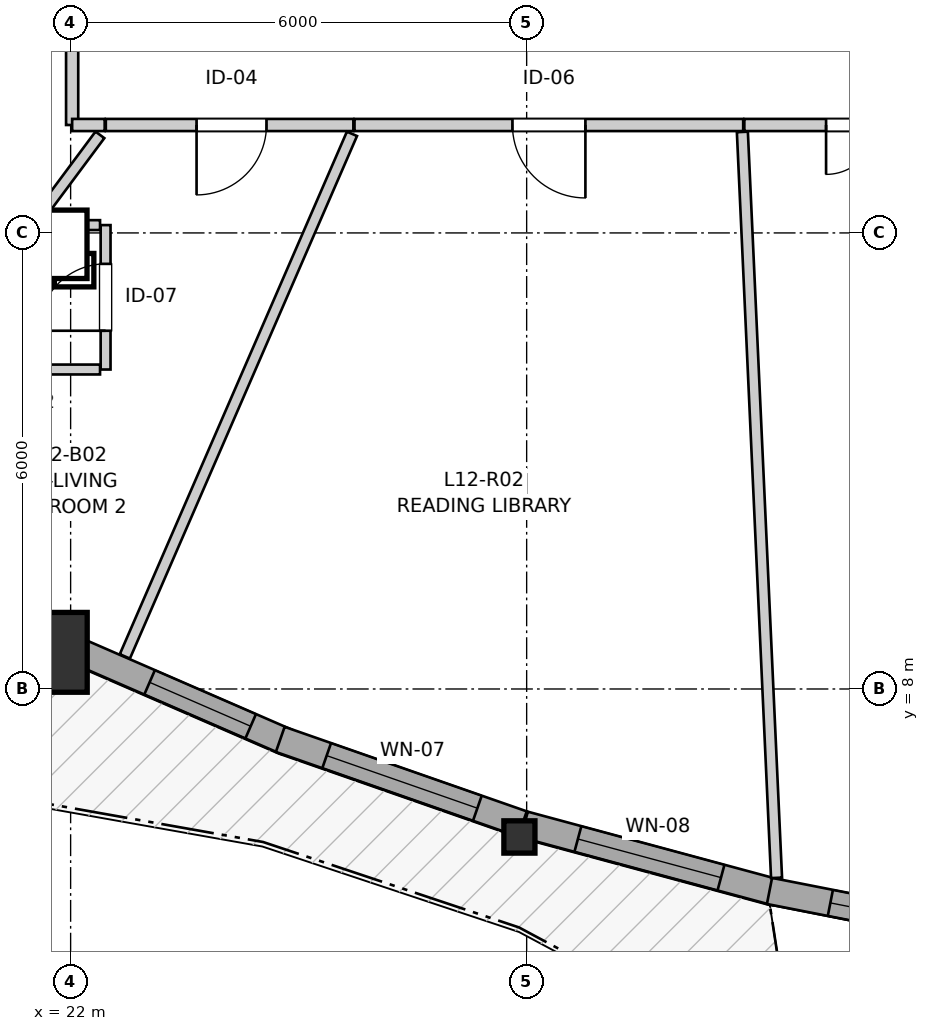
"""IFC4 building model, lengths in metres.
Left out: names, types, materials, properties, quantities, classifications, styles, units other than length and angle.
Written with IfcOpenShell. Run it as: python <this file> out.ifc"""

import sys

from ifc_helpers import new_model, si_unit, direction, frame, frame_2d, origin, origin_2d, place, context, subcontext, project, spatial, rectangle, i_section, extrude, source, transform, mapped, element, fill, save


model = new_model("IFC4")
c1 = context("Model", 3, precision=1e-05, world=origin(), true_north=direction((0.0, 1.0)))
c2 = subcontext(c1, "Body", "Model", "MODEL_VIEW")
j1 = project(units=[si_unit("LENGTHUNIT", "METRE"), si_unit("PLANEANGLEUNIT", "RADIAN")], contexts=[c1])
p1 = place(None, origin())
s1 = spatial("IfcSite", under=j1, at=p1, CompositionType="ELEMENT")
p2 = place(p1, origin())
s2 = spatial("IfcBuilding", under=s1, at=p2, CompositionType="ELEMENT")
p3 = place(p2, frame((0.0, 0.0, 43.0)))
s3 = spatial("IfcBuildingStorey", under=s2, at=p3, CompositionType="ELEMENT", Elevation=43.0)
m1 = source(origin(), c2, "Body", "SweptSolid", [
    extrude(rectangle(XDim=1.05, YDim=1.05, at=origin_2d()), origin(), (0.0, 0.0, 1.0), 2.94),
])
p4 = place(p3, frame((21.693, 8.482, 0.0), z_axis=(0.0, 0.0, 1.0), x_axis=(1.0, 0.0, 0.0)))
e1 = element("IfcColumn", 1, at=p4, inside=s3, PredefinedType="COLUMN", context=c2, shape_type="MappedRepresentation", body=[
    mapped(m1, transform((0.0, 0.0, 0.0), x_axis=(1.0, 0.0, 0.0), y_axis=(0.0, 1.0, 0.0), z_axis=(0.0, 0.0, 1.0), scale=1.0)),
])
m2 = source(origin(), c2, "Body", "SweptSolid", [
    extrude(i_section(OverallWidth=0.409, OverallDepth=0.425, WebThickness=0.03, FlangeThickness=0.048, FilletRadius=0.015, at=origin_2d()), origin(), (0.0, 0.0, 1.0), 2.94),
])
p5 = place(p3, frame((27.905, 6.053, 0.0), z_axis=(0.0, 0.0, 1.0), x_axis=(1.0, 0.0, 0.0)))
e2 = element("IfcColumn", 2, at=p5, inside=s3, PredefinedType="PILASTER", context=c2, shape_type="MappedRepresentation", body=[
    mapped(m2, transform((0.0, 0.0, 0.0), x_axis=(1.0, 0.0, 0.0), y_axis=(0.0, 1.0, 0.0), z_axis=(0.0, 0.0, 1.0), scale=1.0)),
])
p6 = place(p3, frame((22.038, 8.523, 0.0), z_axis=(0.0, 0.0, 1.0), x_axis=(0.91704973522, -0.398772846535, 0.0)))
e3 = element("IfcWall", 3, at=p6, inside=s3, PredefinedType="SOLIDWALL", context=c2, shape_type="SweptSolid", body=[
    extrude(rectangle(XDim=3.056, YDim=0.35, at=frame_2d((1.528, 0.0))), origin(), (0.0, 0.0, 1.0), 2.42),
])
p7 = place(p6, frame((1.092, 0.0, 0.82)))
e4 = element("IfcOpeningElement", 4, at=p7, cuts=e3, PredefinedType="OPENING", context=c2, shape_type="SweptSolid", body=[
    extrude(rectangle(XDim=1.45, YDim=1.25, at=frame_2d((0.725, 0.625))), frame((0.0, 0.185, 0.0), z_axis=(0.0, -1.0, 0.0), x_axis=(1.0, 0.0, 0.0)), (0.0, 0.0, 1.0), 0.37),
])
p8 = place(p3, frame((24.758, 7.337, 0.0), z_axis=(0.0, 0.0, 1.0), x_axis=(0.944146789085, -0.329525174547, 0.0)))
e5 = element("IfcWall", 5, at=p8, inside=s3, PredefinedType="SOLIDWALL", context=c2, shape_type="SweptSolid", body=[
    extrude(rectangle(XDim=3.374, YDim=0.35, at=frame_2d((1.687, 0.0))), origin(), (0.0, 0.0, 1.0), 2.42),
])
p9 = place(p8, frame((0.647, 0.0, 0.82)))
e6 = element("IfcOpeningElement", 6, at=p9, cuts=e5, PredefinedType="OPENING", context=c2, shape_type="SweptSolid", body=[
    extrude(rectangle(XDim=2.1, YDim=1.4, at=frame_2d((1.05, 0.7))), frame((0.0, 0.185, 0.0), z_axis=(0.0, -1.0, 0.0), x_axis=(1.0, 0.0, 0.0)), (0.0, 0.0, 1.0), 0.37),
])
p10 = place(p3, frame((27.969, 6.217, 0.0), z_axis=(0.0, 0.0, 1.0), x_axis=(0.965465079887, -0.26053249225, 0.0)))
e7 = element("IfcWall", 7, at=p10, inside=s3, PredefinedType="SOLIDWALL", context=c2, shape_type="SweptSolid", body=[
    extrude(rectangle(XDim=3.43, YDim=0.35, at=frame_2d((1.715, 0.0))), origin(), (0.0, 0.0, 1.0), 2.42),
])
p11 = place(p10, frame((0.73, 0.0, 0.82)))
e8 = element("IfcOpeningElement", 8, at=p11, cuts=e7, PredefinedType="OPENING", context=c2, shape_type="SweptSolid", body=[
    extrude(rectangle(XDim=1.95, YDim=1.4, at=frame_2d((0.975, 0.7))), frame((0.0, 0.185, 0.0), z_axis=(0.0, -1.0, 0.0), x_axis=(1.0, 0.0, 0.0)), (0.0, 0.0, 1.0), 0.37),
])
p12 = place(p3, frame((31.195, 5.343, 0.0), z_axis=(0.0, 0.0, 1.0), x_axis=(0.981233720322, -0.192822161858, 0.0)))
e9 = element("IfcWall", 9, at=p12, inside=s3, PredefinedType="SOLIDWALL", context=c2, shape_type="SweptSolid", body=[
    extrude(rectangle(XDim=3.222, YDim=0.35, at=frame_2d((1.611, 0.0))), origin(), (0.0, 0.0, 1.0), 2.42),
])
p13 = place(p12, frame((0.816, 0.0, 0.82)))
e10 = element("IfcOpeningElement", 10, at=p13, cuts=e9, PredefinedType="OPENING", context=c2, shape_type="SweptSolid", body=[
    extrude(rectangle(XDim=1.6, YDim=1.35, at=frame_2d((0.8, 0.675))), frame((0.0, 0.185, 0.0), z_axis=(0.0, -1.0, 0.0), x_axis=(1.0, 0.0, 0.0)), (0.0, 0.0, 1.0), 0.37),
])
p14 = place(p3, frame((30.849, 15.42, 0.0), z_axis=(0.0, 0.0, 1.0), x_axis=(-1.0, 0.0, 0.0)))
e11 = element("IfcWall", 11, at=p14, inside=s3, PredefinedType="PARTITIONING", context=c2, shape_type="SweptSolid", body=[
    extrude(rectangle(XDim=5.114, YDim=0.16, at=frame_2d((2.557, 0.0))), origin(), (0.0, 0.0, 1.0), 2.94),
])
p15 = place(p14, frame((2.076, 0.0, 0.0)))
e12 = element("IfcOpeningElement", 12, at=p15, cuts=e11, PredefinedType="OPENING", context=c2, shape_type="SweptSolid", body=[
    extrude(rectangle(XDim=0.96, YDim=2.1, at=frame_2d((0.48, 1.05))), frame((0.0, 0.09, 0.0), z_axis=(0.0, -1.0, 0.0), x_axis=(1.0, 0.0, 0.0)), (0.0, 0.0, 1.0), 0.18),
])
p16 = place(p3, frame((34.361, 15.42, 0.0), z_axis=(0.0, 0.0, 1.0), x_axis=(-1.0, 0.0, 0.0)))
e13 = element("IfcWall", 13, at=p16, inside=s3, PredefinedType="PARTITIONING", context=c2, shape_type="SweptSolid", body=[
    extrude(rectangle(XDim=3.497, YDim=0.16, at=frame_2d((1.749, 0.0))), origin(), (0.0, 0.0, 1.0), 2.94),
])
p17 = place(p16, frame((1.122, 0.0, 0.0)))
e14 = element("IfcOpeningElement", 14, at=p17, cuts=e13, PredefinedType="OPENING", context=c2, shape_type="SweptSolid", body=[
    extrude(rectangle(XDim=1.3, YDim=2.1, at=frame_2d((0.65, 1.05))), frame((0.0, 0.09, 0.0), z_axis=(0.0, -1.0, 0.0), x_axis=(1.0, 0.0, 0.0)), (0.0, 0.0, 1.0), 0.18),
])
p18 = place(p3, frame((22.02, 15.42, 0.0), z_axis=(0.0, 0.0, 1.0), x_axis=(0.0, 1.0, 0.0)))
e15 = element("IfcWall", 15, at=p18, inside=s3, PredefinedType="PARTITIONING", context=c2, shape_type="SweptSolid", body=[
    extrude(rectangle(XDim=3.287, YDim=0.16, at=frame_2d((1.644, 0.0))), origin(), (0.0, 0.0, 1.0), 2.94),
])
p19 = place(p18, frame((1.201, 0.0, 0.0)))
e16 = element("IfcOpeningElement", 16, at=p19, cuts=e15, PredefinedType="OPENING", context=c2, shape_type="SweptSolid", body=[
    extrude(rectangle(XDim=0.92, YDim=2.1, at=frame_2d((0.46, 1.05))), frame((0.0, 0.09, 0.0), z_axis=(0.0, -1.0, 0.0), x_axis=(1.0, 0.0, 0.0)), (0.0, 0.0, 1.0), 0.18),
])
p20 = place(p3, frame((25.72, 15.42, 0.0), z_axis=(0.0, 0.0, 1.0), x_axis=(-1.0, 0.0, 0.0)))
e17 = element("IfcWall", 17, at=p20, inside=s3, PredefinedType="PARTITIONING", context=c2, shape_type="SweptSolid", body=[
    extrude(rectangle(XDim=3.257, YDim=0.16, at=frame_2d((1.628, 0.0))), origin(), (0.0, 0.0, 1.0), 2.94),
])
p21 = place(p20, frame((1.143, 0.0, 0.0)))
e18 = element("IfcOpeningElement", 18, at=p21, cuts=e17, PredefinedType="OPENING", context=c2, shape_type="SweptSolid", body=[
    extrude(rectangle(XDim=0.92, YDim=2.1, at=frame_2d((0.46, 1.05))), frame((0.0, 0.09, 0.0), z_axis=(0.0, -1.0, 0.0), x_axis=(1.0, 0.0, 0.0)), (0.0, 0.0, 1.0), 0.18),
])
p22 = place(p3, frame((22.46, 12.203, 0.0), z_axis=(0.0, 0.0, 1.0), x_axis=(0.0, 1.0, 0.0)))
e19 = element("IfcWall", 19, at=p22, inside=s3, PredefinedType="PARTITIONING", context=c2, shape_type="SweptSolid", body=[
    extrude(rectangle(XDim=1.9, YDim=0.13, at=frame_2d((0.95, 0.0))), origin(), (0.0, 0.0, 1.0), 2.94),
])
p23 = place(p22, frame((0.51, 0.0, 0.0)))
e20 = element("IfcOpeningElement", 20, at=p23, cuts=e19, PredefinedType="OPENING", context=c2, shape_type="SweptSolid", body=[
    extrude(rectangle(XDim=0.88, YDim=2.05, at=frame_2d((0.44, 1.025))), frame((0.0, 0.075, 0.0), z_axis=(0.0, -1.0, 0.0), x_axis=(1.0, 0.0, 0.0)), (0.0, 0.0, 1.0), 0.15),
])
p24 = place(p3, frame((30.838, 15.329, 0.0), z_axis=(0.0, 0.0, 1.0), x_axis=(0.045777414824, -0.998951664642, 0.0)))
e21 = element("IfcWall", 21, at=p24, inside=s3, PredefinedType="PARTITIONING", context=c2, shape_type="SweptSolid", body=[
    extrude(rectangle(XDim=9.824, YDim=0.145, at=frame_2d((4.912, 0.0))), origin(), (0.0, 0.0, 1.0), 2.94),
])
p25 = place(p3, frame((22.713, 8.429, 0.0), z_axis=(0.0, 0.0, 1.0), x_axis=(0.398615352261, 0.917118204454, 0.0)))
e22 = element("IfcWall", 22, at=p25, inside=s3, PredefinedType="PARTITIONING", context=c2, shape_type="SweptSolid", body=[
    extrude(rectangle(XDim=7.496, YDim=0.145, at=frame_2d((3.748, 0.0))), origin(), (0.0, 0.0, 1.0), 2.94),
])
p26 = place(p3, frame((18.614, 15.774, 0.0), z_axis=(0.0, 0.0, 1.0), x_axis=(0.753902736672, 0.656986045239, 0.0)))
e23 = element("IfcWall", 23, at=p26, inside=s3, PredefinedType="PARTITIONING", context=c2, shape_type="SweptSolid", body=[
    extrude(rectangle(XDim=4.34, YDim=0.145, at=frame_2d((2.17, 0.0))), origin(), (0.0, 0.0, 1.0), 2.94),
])
p27 = place(p3, frame((20.66, 12.203, 0.0), z_axis=(0.0, 0.0, 1.0), x_axis=(1.0, 0.0, 0.0)))
e24 = element("IfcWall", 24, at=p27, inside=s3, PredefinedType="PARTITIONING", context=c2, shape_type="SweptSolid", body=[
    extrude(rectangle(XDim=1.727, YDim=0.13, at=frame_2d((0.864, 0.0))), origin(), (0.0, 0.0, 1.0), 2.94),
])
p28 = place(p3, frame((21.491, 14.088, 0.0), z_axis=(0.0, 0.0, 1.0), x_axis=(0.596893728005, 0.802320308523, 0.0)))
e25 = element("IfcWall", 25, at=p28, inside=s3, PredefinedType="PARTITIONING", context=c2, shape_type="SweptSolid", body=[
    extrude(rectangle(XDim=1.499, YDim=0.145, at=frame_2d((0.749, 0.0))), origin(), (0.0, 0.0, 1.0), 2.94),
])
p29 = place(p3, frame((21.649, 14.103, 0.0), z_axis=(0.0, 0.0, 1.0), x_axis=(1.0, 0.0, 0.0)))
e26 = element("IfcWall", 26, at=p29, inside=s3, PredefinedType="PARTITIONING", context=c2, shape_type="SweptSolid", body=[
    extrude(rectangle(XDim=0.738, YDim=0.13, at=frame_2d((0.369, 0.0))), origin(), (0.0, 0.0, 1.0), 2.94),
])
p30 = place(p3, frame((22.02, 15.42, 0.0), z_axis=(0.0, 0.0, 1.0), x_axis=(1.0, 0.0, 0.0)))
e27 = element("IfcWall", 27, at=p30, inside=s3, PredefinedType="PARTITIONING", context=c2, shape_type="SweptSolid", body=[
    extrude(rectangle(XDim=0.428, YDim=0.16, at=frame_2d((0.214, 0.0))), origin(), (0.0, 0.0, 1.0), 2.94),
])
m3 = source(origin(), c2, "Body", "SweptSolid", [
    extrude(rectangle(XDim=1.45, YDim=1.25, at=frame_2d((0.725, 0.625))), frame((0.0, 0.03, 0.0), z_axis=(0.0, -1.0, 0.0), x_axis=(1.0, 0.0, 0.0)), (0.0, 0.0, 1.0), 0.06),
])
p31 = place(p7, origin())
e28 = element("IfcWindow", 28, at=p31, inside=s3, PartitioningType="SINGLE_PANEL", PredefinedType="WINDOW", context=c2, shape_type="MappedRepresentation", body=[
    mapped(m3, transform((0.0, 0.0, 0.0), x_axis=(1.0, 0.0, 0.0), y_axis=(0.0, 1.0, 0.0), z_axis=(0.0, 0.0, 1.0), scale=1.0)),
])
fill(e4, e28)
m4 = source(origin(), c2, "Body", "SweptSolid", [
    extrude(rectangle(XDim=2.1, YDim=1.4, at=frame_2d((1.05, 0.7))), frame((0.0, 0.03, 0.0), z_axis=(0.0, -1.0, 0.0), x_axis=(1.0, 0.0, 0.0)), (0.0, 0.0, 1.0), 0.06),
])
p32 = place(p9, origin())
e29 = element("IfcWindow", 29, at=p32, inside=s3, PartitioningType="SINGLE_PANEL", PredefinedType="WINDOW", context=c2, shape_type="MappedRepresentation", body=[
    mapped(m4, transform((0.0, 0.0, 0.0), x_axis=(1.0, 0.0, 0.0), y_axis=(0.0, 1.0, 0.0), z_axis=(0.0, 0.0, 1.0), scale=1.0)),
])
fill(e6, e29)
m5 = source(origin(), c2, "Body", "SweptSolid", [
    extrude(rectangle(XDim=1.95, YDim=1.4, at=frame_2d((0.975, 0.7))), frame((0.0, 0.03, 0.0), z_axis=(0.0, -1.0, 0.0), x_axis=(1.0, 0.0, 0.0)), (0.0, 0.0, 1.0), 0.06),
])
p33 = place(p11, origin())
e30 = element("IfcWindow", 30, at=p33, inside=s3, PartitioningType="SINGLE_PANEL", PredefinedType="WINDOW", context=c2, shape_type="MappedRepresentation", body=[
    mapped(m5, transform((0.0, 0.0, 0.0), x_axis=(1.0, 0.0, 0.0), y_axis=(0.0, 1.0, 0.0), z_axis=(0.0, 0.0, 1.0), scale=1.0)),
])
fill(e8, e30)
m6 = source(origin(), c2, "Body", "SweptSolid", [
    extrude(rectangle(XDim=1.6, YDim=1.35, at=frame_2d((0.8, 0.675))), frame((0.0, 0.03, 0.0), z_axis=(0.0, -1.0, 0.0), x_axis=(1.0, 0.0, 0.0)), (0.0, 0.0, 1.0), 0.06),
])
p34 = place(p13, origin())
e31 = element("IfcWindow", 31, at=p34, inside=s3, PartitioningType="SINGLE_PANEL", PredefinedType="WINDOW", context=c2, shape_type="MappedRepresentation", body=[
    mapped(m6, transform((0.0, 0.0, 0.0), x_axis=(1.0, 0.0, 0.0), y_axis=(0.0, 1.0, 0.0), z_axis=(0.0, 0.0, 1.0), scale=1.0)),
])
fill(e10, e31)
m7 = source(origin(), c2, "Body", "SweptSolid", [
    extrude(rectangle(XDim=0.96, YDim=2.1, at=frame_2d((0.48, 1.05))), frame((0.0, 0.025, 0.0), z_axis=(0.0, -1.0, 0.0), x_axis=(1.0, 0.0, 0.0)), (0.0, 0.0, 1.0), 0.05),
])
p35 = place(p15, origin())
e32 = element("IfcDoor", 32, at=p35, inside=s3, OperationType="SINGLE_SWING_LEFT", PredefinedType="DOOR", context=c2, shape_type="MappedRepresentation", body=[
    mapped(m7, transform((0.0, 0.0, 0.0), x_axis=(1.0, 0.0, 0.0), y_axis=(0.0, 1.0, 0.0), z_axis=(0.0, 0.0, 1.0), scale=1.0)),
])
fill(e12, e32)
m8 = source(origin(), c2, "Body", "SweptSolid", [
    extrude(rectangle(XDim=1.3, YDim=2.1, at=frame_2d((0.65, 1.05))), frame((0.0, 0.025, 0.0), z_axis=(0.0, -1.0, 0.0), x_axis=(1.0, 0.0, 0.0)), (0.0, 0.0, 1.0), 0.05),
])
p36 = place(p17, origin())
e33 = element("IfcDoor", 33, at=p36, inside=s3, OperationType="DOUBLE_DOOR_SINGLE_SWING", PredefinedType="DOOR", context=c2, shape_type="MappedRepresentation", body=[
    mapped(m8, transform((0.0, 0.0, 0.0), x_axis=(1.0, 0.0, 0.0), y_axis=(0.0, 1.0, 0.0), z_axis=(0.0, 0.0, 1.0), scale=1.0)),
])
fill(e14, e33)
m9 = source(origin(), c2, "Body", "SweptSolid", [
    extrude(rectangle(XDim=0.92, YDim=2.1, at=frame_2d((0.46, 1.05))), frame((0.0, 0.025, 0.0), z_axis=(0.0, -1.0, 0.0), x_axis=(1.0, 0.0, 0.0)), (0.0, 0.0, 1.0), 0.05),
])
p37 = place(p21, origin())
e34 = element("IfcDoor", 34, at=p37, inside=s3, OperationType="SINGLE_SWING_RIGHT", PredefinedType="DOOR", context=c2, shape_type="MappedRepresentation", body=[
    mapped(m9, transform((0.0, 0.0, 0.0), x_axis=(1.0, 0.0, 0.0), y_axis=(0.0, 1.0, 0.0), z_axis=(0.0, 0.0, 1.0), scale=1.0)),
])
fill(e18, e34)
m10 = source(origin(), c2, "Body", "SweptSolid", [
    extrude(rectangle(XDim=0.88, YDim=2.05, at=frame_2d((0.44, 1.025))), frame((0.0, 0.025, 0.0), z_axis=(0.0, -1.0, 0.0), x_axis=(1.0, 0.0, 0.0)), (0.0, 0.0, 1.0), 0.05),
])
p38 = place(p23, origin())
e35 = element("IfcDoor", 35, at=p38, inside=s3, OperationType="SINGLE_SWING_LEFT", PredefinedType="DOOR", context=c2, shape_type="MappedRepresentation", body=[
    mapped(m10, transform((0.0, 0.0, 0.0), x_axis=(1.0, 0.0, 0.0), y_axis=(0.0, 1.0, 0.0), z_axis=(0.0, 0.0, 1.0), scale=1.0)),
])
fill(e20, e35)
save(model, sys.argv[1])
